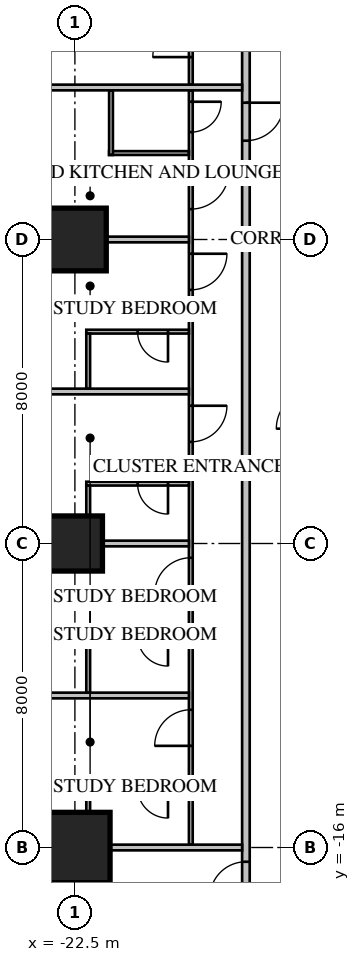
"""IFC4 building model, lengths in metres.
Left out: names, types, materials, properties, quantities, classifications, styles, units other than length and angle.
Written with IfcOpenShell. Run it as: python <this file> out.ifc"""

import sys

from ifc_helpers import new_model, si_unit, direction, frame, frame_2d, origin, origin_2d, place, context, subcontext, project, spatial, rectangle, extrude, element, fill, save


model = new_model("IFC4")
c1 = context("Model", 3, precision=1e-05, world=origin(), true_north=direction((0.0, 1.0)))
c2 = subcontext(c1, "Body", "Model", "MODEL_VIEW")
j1 = project(units=[si_unit("LENGTHUNIT", "METRE"), si_unit("PLANEANGLEUNIT", "RADIAN")], contexts=[c1])
p1 = place(None, origin())
s1 = spatial("IfcSite", under=j1, at=p1, CompositionType="ELEMENT")
p2 = place(p1, origin())
s2 = spatial("IfcBuilding", under=s1, at=p2, CompositionType="ELEMENT")
p3 = place(p2, frame((0.0, 0.0, 23.7)))
s3 = spatial("IfcBuildingStorey", under=s2, at=p3, CompositionType="ELEMENT", Elevation=23.7)
p4 = place(p3, frame((-22.5, 0.0, 0.0), z_axis=(0.0, 0.0, 1.0), x_axis=(1.0, 0.0, 0.0)))
e1 = element("IfcColumn", 1, at=p4, inside=s3, PredefinedType="COLUMN", context=c2, shape_type="SweptSolid", body=[
    extrude(rectangle(XDim=1.65, YDim=1.65, at=origin_2d()), origin(), (0.0, 0.0, 1.0), 3.85),
])
p5 = place(p3, frame((-22.5, -8.0, 0.0), z_axis=(0.0, 0.0, 1.0), x_axis=(1.0, 0.0, 0.0)))
e2 = element("IfcColumn", 2, at=p5, inside=s3, PredefinedType="COLUMN", context=c2, shape_type="SweptSolid", body=[
    extrude(rectangle(XDim=1.45, YDim=1.45, at=origin_2d()), origin(), (0.0, 0.0, 1.0), 3.85),
])
p6 = place(p3, frame((-22.5, -16.0, 0.0), z_axis=(0.0, 0.0, 1.0), x_axis=(1.0, 0.0, 0.0)))
e3 = element("IfcColumn", 3, at=p6, inside=s3, PredefinedType="COLUMN", context=c2, shape_type="SweptSolid", body=[
    extrude(rectangle(XDim=1.85, YDim=1.85, at=origin_2d()), origin(), (0.0, 0.0, 1.0), 3.85),
])
p7 = place(p3, frame((-18.0, 18.0, 0.0), z_axis=(0.0, 0.0, 1.0), x_axis=(0.0, -1.0, 0.0)))
e4 = element("IfcWall", 4, at=p7, inside=s3, PredefinedType="PARTITIONING", context=c2, shape_type="SweptSolid", body=[
    extrude(rectangle(XDim=36.0, YDim=0.2, at=frame_2d((18.0, 0.0))), origin(), (0.0, 0.0, 1.0), 3.65),
])
p8 = place(p7, frame((10.4, 0.0, 0.0)))
e5 = element("IfcOpeningElement", 5, at=p8, cuts=e4, PredefinedType="OPENING", context=c2, shape_type="SweptSolid", body=[
    extrude(rectangle(XDim=1.0, YDim=2.1, at=frame_2d((0.5, 1.05))), frame((0.0, 0.12, 0.0), z_axis=(0.0, -1.0, 0.0), x_axis=(1.0, 0.0, 0.0)), (0.0, 0.0, 1.0), 0.24),
])
p9 = place(p7, frame((14.4, 0.0, 0.0)))
e6 = element("IfcOpeningElement", 6, at=p9, cuts=e4, PredefinedType="OPENING", context=c2, shape_type="SweptSolid", body=[
    extrude(rectangle(XDim=1.0, YDim=2.1, at=frame_2d((0.5, 1.05))), frame((0.0, 0.12, 0.0), z_axis=(0.0, -1.0, 0.0), x_axis=(1.0, 0.0, 0.0)), (0.0, 0.0, 1.0), 0.24),
])
p10 = place(p7, frame((0.375, 0.0, 0.0)))
e7 = element("IfcOpeningElement", 7, at=p10, cuts=e4, PredefinedType="OPENING", context=c2, shape_type="SweptSolid", body=[
    extrude(rectangle(XDim=1.0, YDim=2.1, at=frame_2d((0.5, 1.05))), frame((0.0, 0.12, 0.0), z_axis=(0.0, -1.0, 0.0), x_axis=(1.0, 0.0, 0.0)), (0.0, 0.0, 1.0), 0.24),
])
p11 = place(p7, frame((34.375, 0.0, 0.0)))
e8 = element("IfcOpeningElement", 8, at=p11, cuts=e4, PredefinedType="OPENING", context=c2, shape_type="SweptSolid", body=[
    extrude(rectangle(XDim=0.95, YDim=2.1, at=frame_2d((0.475, 1.05))), frame((0.0, 0.12, 0.0), z_axis=(0.0, -1.0, 0.0), x_axis=(1.0, 0.0, 0.0)), (0.0, 0.0, 1.0), 0.24),
])
p12 = place(p3, frame((-19.45, 15.925, 0.0), z_axis=(0.0, 0.0, 1.0), x_axis=(0.0, -1.0, 0.0)))
e9 = element("IfcWall", 9, at=p12, inside=s3, PredefinedType="PARTITIONING", context=c2, shape_type="SweptSolid", body=[
    extrude(rectangle(XDim=11.85, YDim=0.1, at=frame_2d((5.925, 0.0))), origin(), (0.0, 0.0, 1.0), 3.65),
])
p13 = place(p12, frame((10.125, 0.0, 0.0)))
e10 = element("IfcOpeningElement", 10, at=p13, cuts=e9, PredefinedType="OPENING", context=c2, shape_type="SweptSolid", body=[
    extrude(rectangle(XDim=1.0, YDim=2.1, at=frame_2d((0.5, 1.05))), frame((0.0, 0.07, 0.0), z_axis=(0.0, -1.0, 0.0), x_axis=(1.0, 0.0, 0.0)), (0.0, 0.0, 1.0), 0.14),
])
p14 = place(p12, frame((8.3, 0.0, 0.0)))
e11 = element("IfcOpeningElement", 11, at=p14, cuts=e9, PredefinedType="OPENING", context=c2, shape_type="SweptSolid", body=[
    extrude(rectangle(XDim=0.8, YDim=2.1, at=frame_2d((0.4, 1.05))), frame((0.0, 0.07, 0.0), z_axis=(0.0, -1.0, 0.0), x_axis=(1.0, 0.0, 0.0)), (0.0, 0.0, 1.0), 0.14),
])
p15 = place(p12, frame((0.3, 0.0, 0.0)))
e12 = element("IfcOpeningElement", 12, at=p15, cuts=e9, PredefinedType="OPENING", context=c2, shape_type="SweptSolid", body=[
    extrude(rectangle(XDim=0.95, YDim=2.1, at=frame_2d((0.475, 1.05))), frame((0.0, 0.07, 0.0), z_axis=(0.0, -1.0, 0.0), x_axis=(1.0, 0.0, 0.0)), (0.0, 0.0, 1.0), 0.14),
])
p16 = place(p12, frame((4.3, 0.0, 0.0)))
e13 = element("IfcOpeningElement", 13, at=p16, cuts=e9, PredefinedType="OPENING", context=c2, shape_type="SweptSolid", body=[
    extrude(rectangle(XDim=0.95, YDim=2.1, at=frame_2d((0.475, 1.05))), frame((0.0, 0.07, 0.0), z_axis=(0.0, -1.0, 0.0), x_axis=(1.0, 0.0, 0.0)), (0.0, 0.0, 1.0), 0.14),
])
p17 = place(p3, frame((-19.45, 3.925, 0.0), z_axis=(0.0, 0.0, 1.0), x_axis=(0.0, -1.0, 0.0)))
e14 = element("IfcWall", 14, at=p17, inside=s3, PredefinedType="PARTITIONING", context=c2, shape_type="SweptSolid", body=[
    extrude(rectangle(XDim=19.85, YDim=0.1, at=frame_2d((9.925, 0.0))), origin(), (0.0, 0.0, 1.0), 3.65),
])
p18 = place(p17, frame((2.125, 0.0, 0.0)))
e15 = element("IfcOpeningElement", 15, at=p18, cuts=e14, PredefinedType="OPENING", context=c2, shape_type="SweptSolid", body=[
    extrude(rectangle(XDim=1.0, YDim=2.1, at=frame_2d((0.5, 1.05))), frame((0.0, 0.07, 0.0), z_axis=(0.0, -1.0, 0.0), x_axis=(1.0, 0.0, 0.0)), (0.0, 0.0, 1.0), 0.14),
])
p19 = place(p17, frame((0.3, 0.0, 0.0)))
e16 = element("IfcOpeningElement", 16, at=p19, cuts=e14, PredefinedType="OPENING", context=c2, shape_type="SweptSolid", body=[
    extrude(rectangle(XDim=0.8, YDim=2.1, at=frame_2d((0.4, 1.05))), frame((0.0, 0.07, 0.0), z_axis=(0.0, -1.0, 0.0), x_axis=(1.0, 0.0, 0.0)), (0.0, 0.0, 1.0), 0.14),
])
p20 = place(p17, frame((4.3, 0.0, 0.0)))
e17 = element("IfcOpeningElement", 17, at=p20, cuts=e14, PredefinedType="OPENING", context=c2, shape_type="SweptSolid", body=[
    extrude(rectangle(XDim=0.95, YDim=2.1, at=frame_2d((0.475, 1.05))), frame((0.0, 0.07, 0.0), z_axis=(0.0, -1.0, 0.0), x_axis=(1.0, 0.0, 0.0)), (0.0, 0.0, 1.0), 0.14),
])
p21 = place(p17, frame((8.3, 0.0, 0.0)))
e18 = element("IfcOpeningElement", 18, at=p21, cuts=e14, PredefinedType="OPENING", context=c2, shape_type="SweptSolid", body=[
    extrude(rectangle(XDim=0.95, YDim=2.1, at=frame_2d((0.475, 1.05))), frame((0.0, 0.07, 0.0), z_axis=(0.0, -1.0, 0.0), x_axis=(1.0, 0.0, 0.0)), (0.0, 0.0, 1.0), 0.14),
])
p22 = place(p17, frame((12.3, 0.0, 0.0)))
e19 = element("IfcOpeningElement", 19, at=p22, cuts=e14, PredefinedType="OPENING", context=c2, shape_type="SweptSolid", body=[
    extrude(rectangle(XDim=0.95, YDim=2.1, at=frame_2d((0.475, 1.05))), frame((0.0, 0.07, 0.0), z_axis=(0.0, -1.0, 0.0), x_axis=(1.0, 0.0, 0.0)), (0.0, 0.0, 1.0), 0.14),
])
p23 = place(p17, frame((16.3, 0.0, 0.0)))
e20 = element("IfcOpeningElement", 20, at=p23, cuts=e14, PredefinedType="OPENING", context=c2, shape_type="SweptSolid", body=[
    extrude(rectangle(XDim=0.95, YDim=2.1, at=frame_2d((0.475, 1.05))), frame((0.0, 0.07, 0.0), z_axis=(0.0, -1.0, 0.0), x_axis=(1.0, 0.0, 0.0)), (0.0, 0.0, 1.0), 0.14),
])
p24 = place(p3, frame((-19.5, 2.275, 0.0), z_axis=(0.0, 0.0, 1.0), x_axis=(-1.0, 0.0, 0.0)))
e21 = element("IfcWall", 21, at=p24, inside=s3, PredefinedType="PARTITIONING", context=c2, shape_type="SweptSolid", body=[
    extrude(rectangle(XDim=2.1, YDim=0.1, at=frame_2d((1.05, 0.0))), origin(), (0.0, 0.0, 1.0), 3.65),
])
p25 = place(p3, frame((-21.55, 3.925, 0.0), z_axis=(0.0, 0.0, 1.0), x_axis=(0.0, -1.0, 0.0)))
e22 = element("IfcWall", 22, at=p25, inside=s3, PredefinedType="PARTITIONING", context=c2, shape_type="SweptSolid", body=[
    extrude(rectangle(XDim=1.7, YDim=0.1, at=frame_2d((0.85, 0.0))), origin(), (0.0, 0.0, 1.0), 3.65),
])
p26 = place(p3, frame((-18.1, 4.0, 0.0), z_axis=(0.0, 0.0, 1.0), x_axis=(-1.0, 0.0, 0.0)))
e23 = element("IfcWall", 23, at=p26, inside=s3, PredefinedType="PARTITIONING", context=c2, shape_type="SweptSolid", body=[
    extrude(rectangle(XDim=6.6, YDim=0.15, at=frame_2d((3.3, 0.0))), origin(), (0.0, 0.0, 1.0), 3.65),
])
p27 = place(p3, frame((-19.5, 0.0, 0.0), z_axis=(0.0, 0.0, 1.0), x_axis=(-1.0, 0.0, 0.0)))
e24 = element("IfcWall", 24, at=p27, inside=s3, PredefinedType="PARTITIONING", context=c2, shape_type="SweptSolid", body=[
    extrude(rectangle(XDim=5.2, YDim=0.15, at=frame_2d((2.6, 0.0))), origin(), (0.0, 0.0, 1.0), 2.957),
])
for number, where, z_axis, x_axis in (
    (25, (-19.5, -4.0, 0.0), (0.0, 0.0, 1.0), (-1.0, 0.0, 0.0)),
    (26, (-19.5, -8.0, 0.0), (0.0, 0.0, 1.0), (-1.0, 0.0, 0.0)),
    (27, (-19.5, -12.0, 0.0), (0.0, 0.0, 1.0), (-1.0, 0.0, 0.0)),
):
    element("IfcWall", number, at=place(p3, frame(where, z_axis=z_axis, x_axis=x_axis)), inside=s3, PredefinedType="PARTITIONING", context=c2, shape_type="SweptSolid", body=[
        extrude(rectangle(XDim=5.2, YDim=0.15, at=frame_2d((2.6, 0.0))), origin(), (0.0, 0.0, 1.0), 3.65),
    ])
p28 = place(p3, frame((-18.1, -16.0, 0.0), z_axis=(0.0, 0.0, 1.0), x_axis=(-1.0, 0.0, 0.0)))
e28 = element("IfcWall", 28, at=p28, inside=s3, PredefinedType="PARTITIONING", context=c2, shape_type="SweptSolid", body=[
    extrude(rectangle(XDim=6.589, YDim=0.15, at=frame_2d((3.295, 0.0))), origin(), (0.0, 0.0, 1.0), 3.65),
])
p29 = place(p3, frame((-19.5, -2.425, 0.0), z_axis=(0.0, 0.0, 1.0), x_axis=(-1.0, 0.0, 0.0)))
e29 = element("IfcWall", 29, at=p29, inside=s3, PredefinedType="PARTITIONING", context=c2, shape_type="SweptSolid", body=[
    extrude(rectangle(XDim=2.7, YDim=0.1, at=frame_2d((1.35, 0.0))), origin(), (0.0, 0.0, 1.0), 3.65),
])
p30 = place(p29, frame((0.55, 0.0, 0.0)))
e30 = element("IfcOpeningElement", 30, at=p30, cuts=e29, PredefinedType="OPENING", context=c2, shape_type="SweptSolid", body=[
    extrude(rectangle(XDim=0.8, YDim=2.1, at=frame_2d((0.4, 1.05))), frame((0.0, 0.07, 0.0), z_axis=(0.0, -1.0, 0.0), x_axis=(1.0, 0.0, 0.0)), (0.0, 0.0, 1.0), 0.14),
])
p31 = place(p3, frame((-22.15, -2.475, 0.0), z_axis=(0.0, 0.0, 1.0), x_axis=(0.0, -1.0, 0.0)))
e31 = element("IfcWall", 31, at=p31, inside=s3, PredefinedType="PARTITIONING", context=c2, shape_type="SweptSolid", body=[
    extrude(rectangle(XDim=1.45, YDim=0.1, at=frame_2d((0.725, 0.0))), origin(), (0.0, 0.0, 1.0), 3.65),
])
p32 = place(p3, frame((-19.5, -6.425, 0.0), z_axis=(0.0, 0.0, 1.0), x_axis=(-1.0, 0.0, 0.0)))
e32 = element("IfcWall", 32, at=p32, inside=s3, PredefinedType="PARTITIONING", context=c2, shape_type="SweptSolid", body=[
    extrude(rectangle(XDim=2.7, YDim=0.1, at=frame_2d((1.35, 0.0))), origin(), (0.0, 0.0, 1.0), 3.65),
])
p33 = place(p32, frame((0.55, 0.0, 0.0)))
e33 = element("IfcOpeningElement", 33, at=p33, cuts=e32, PredefinedType="OPENING", context=c2, shape_type="SweptSolid", body=[
    extrude(rectangle(XDim=0.8, YDim=2.1, at=frame_2d((0.4, 1.05))), frame((0.0, 0.07, 0.0), z_axis=(0.0, -1.0, 0.0), x_axis=(1.0, 0.0, 0.0)), (0.0, 0.0, 1.0), 0.14),
])
p34 = place(p3, frame((-22.15, -6.475, 0.0), z_axis=(0.0, 0.0, 1.0), x_axis=(0.0, -1.0, 0.0)))
e34 = element("IfcWall", 34, at=p34, inside=s3, PredefinedType="PARTITIONING", context=c2, shape_type="SweptSolid", body=[
    extrude(rectangle(XDim=1.45, YDim=0.1, at=frame_2d((0.725, 0.0))), origin(), (0.0, 0.0, 1.0), 3.65),
])
p35 = place(p3, frame((-19.5, -10.425, 0.0), z_axis=(0.0, 0.0, 1.0), x_axis=(-1.0, 0.0, 0.0)))
e35 = element("IfcWall", 35, at=p35, inside=s3, PredefinedType="PARTITIONING", context=c2, shape_type="SweptSolid", body=[
    extrude(rectangle(XDim=2.7, YDim=0.1, at=frame_2d((1.35, 0.0))), origin(), (0.0, 0.0, 1.0), 3.65),
])
p36 = place(p35, frame((0.55, 0.0, 0.0)))
e36 = element("IfcOpeningElement", 36, at=p36, cuts=e35, PredefinedType="OPENING", context=c2, shape_type="SweptSolid", body=[
    extrude(rectangle(XDim=0.8, YDim=2.1, at=frame_2d((0.4, 1.05))), frame((0.0, 0.07, 0.0), z_axis=(0.0, -1.0, 0.0), x_axis=(1.0, 0.0, 0.0)), (0.0, 0.0, 1.0), 0.14),
])
p37 = place(p3, frame((-22.15, -10.475, 0.0), z_axis=(0.0, 0.0, 1.0), x_axis=(0.0, -1.0, 0.0)))
e37 = element("IfcWall", 37, at=p37, inside=s3, PredefinedType="PARTITIONING", context=c2, shape_type="SweptSolid", body=[
    extrude(rectangle(XDim=1.45, YDim=0.1, at=frame_2d((0.725, 0.0))), origin(), (0.0, 0.0, 1.0), 3.65),
])
p38 = place(p3, frame((-19.5, -14.425, 0.0), z_axis=(0.0, 0.0, 1.0), x_axis=(-1.0, 0.0, 0.0)))
e38 = element("IfcWall", 38, at=p38, inside=s3, PredefinedType="PARTITIONING", context=c2, shape_type="SweptSolid", body=[
    extrude(rectangle(XDim=2.7, YDim=0.1, at=frame_2d((1.35, 0.0))), origin(), (0.0, 0.0, 1.0), 3.65),
])
p39 = place(p38, frame((0.55, 0.0, 0.0)))
e39 = element("IfcOpeningElement", 39, at=p39, cuts=e38, PredefinedType="OPENING", context=c2, shape_type="SweptSolid", body=[
    extrude(rectangle(XDim=0.8, YDim=2.1, at=frame_2d((0.4, 1.05))), frame((0.0, 0.07, 0.0), z_axis=(0.0, -1.0, 0.0), x_axis=(1.0, 0.0, 0.0)), (0.0, 0.0, 1.0), 0.14),
])
p40 = place(p3, frame((-22.15, -14.475, 0.0), z_axis=(0.0, 0.0, 1.0), x_axis=(0.0, -1.0, 0.0)))
e40 = element("IfcWall", 40, at=p40, inside=s3, PredefinedType="PARTITIONING", context=c2, shape_type="SweptSolid", body=[
    extrude(rectangle(XDim=1.45, YDim=0.1, at=frame_2d((0.725, 0.0))), origin(), (0.0, 0.0, 1.0), 3.65),
])
p41 = place(p13, origin())
e41 = element("IfcDoor", 41, at=p41, inside=s3, OperationType="SINGLE_SWING_RIGHT", PredefinedType="DOOR", context=c2, shape_type="SweptSolid", body=[
    extrude(rectangle(XDim=1.0, YDim=2.1, at=frame_2d((0.5, 1.05))), frame((0.0, 0.025, 0.0), z_axis=(0.0, -1.0, 0.0), x_axis=(1.0, 0.0, 0.0)), (0.0, 0.0, 1.0), 0.05),
])
fill(e10, e41)
p42 = place(p9, origin())
e42 = element("IfcDoor", 42, at=p42, inside=s3, OperationType="SINGLE_SWING_LEFT", PredefinedType="DOOR", context=c2, shape_type="SweptSolid", body=[
    extrude(rectangle(XDim=1.0, YDim=2.1, at=frame_2d((0.5, 1.05))), frame((0.0, 0.025, 0.0), z_axis=(0.0, -1.0, 0.0), x_axis=(1.0, 0.0, 0.0)), (0.0, 0.0, 1.0), 0.05),
])
fill(e6, e42)
p43 = place(p18, origin())
e43 = element("IfcDoor", 43, at=p43, inside=s3, OperationType="SINGLE_SWING_LEFT", PredefinedType="DOOR", context=c2, shape_type="SweptSolid", body=[
    extrude(rectangle(XDim=1.0, YDim=2.1, at=frame_2d((0.5, 1.05))), frame((0.0, 0.025, 0.0), z_axis=(0.0, -1.0, 0.0), x_axis=(1.0, 0.0, 0.0)), (0.0, 0.0, 1.0), 0.05),
])
fill(e15, e43)
p44 = place(p19, origin())
e44 = element("IfcDoor", 44, at=p44, inside=s3, OperationType="SINGLE_SWING_LEFT", PredefinedType="DOOR", context=c2, shape_type="SweptSolid", body=[
    extrude(rectangle(XDim=0.8, YDim=2.1, at=frame_2d((0.4, 1.05))), frame((0.0, 0.025, 0.0), z_axis=(0.0, -1.0, 0.0), x_axis=(1.0, 0.0, 0.0)), (0.0, 0.0, 1.0), 0.05),
])
fill(e16, e44)
p45 = place(p20, origin())
e45 = element("IfcDoor", 45, at=p45, inside=s3, OperationType="SINGLE_SWING_LEFT", PredefinedType="DOOR", context=c2, shape_type="SweptSolid", body=[
    extrude(rectangle(XDim=0.95, YDim=2.1, at=frame_2d((0.475, 1.05))), frame((0.0, 0.025, 0.0), z_axis=(0.0, -1.0, 0.0), x_axis=(1.0, 0.0, 0.0)), (0.0, 0.0, 1.0), 0.05),
])
fill(e17, e45)
p46 = place(p30, origin())
e46 = element("IfcDoor", 46, at=p46, inside=s3, OperationType="SINGLE_SWING_LEFT", PredefinedType="DOOR", context=c2, shape_type="SweptSolid", body=[
    extrude(rectangle(XDim=0.8, YDim=2.1, at=frame_2d((0.4, 1.05))), frame((0.0, 0.025, 0.0), z_axis=(0.0, -1.0, 0.0), x_axis=(1.0, 0.0, 0.0)), (0.0, 0.0, 1.0), 0.05),
])
fill(e30, e46)
p47 = place(p21, origin())
e47 = element("IfcDoor", 47, at=p47, inside=s3, OperationType="SINGLE_SWING_LEFT", PredefinedType="DOOR", context=c2, shape_type="SweptSolid", body=[
    extrude(rectangle(XDim=0.95, YDim=2.1, at=frame_2d((0.475, 1.05))), frame((0.0, 0.025, 0.0), z_axis=(0.0, -1.0, 0.0), x_axis=(1.0, 0.0, 0.0)), (0.0, 0.0, 1.0), 0.05),
])
fill(e18, e47)
p48 = place(p33, origin())
e48 = element("IfcDoor", 48, at=p48, inside=s3, OperationType="SINGLE_SWING_LEFT", PredefinedType="DOOR", context=c2, shape_type="SweptSolid", body=[
    extrude(rectangle(XDim=0.8, YDim=2.1, at=frame_2d((0.4, 1.05))), frame((0.0, 0.025, 0.0), z_axis=(0.0, -1.0, 0.0), x_axis=(1.0, 0.0, 0.0)), (0.0, 0.0, 1.0), 0.05),
])
fill(e33, e48)
p49 = place(p22, origin())
e49 = element("IfcDoor", 49, at=p49, inside=s3, OperationType="SINGLE_SWING_RIGHT", PredefinedType="DOOR", context=c2, shape_type="SweptSolid", body=[
    extrude(rectangle(XDim=0.95, YDim=2.1, at=frame_2d((0.475, 1.05))), frame((0.0, 0.025, 0.0), z_axis=(0.0, -1.0, 0.0), x_axis=(1.0, 0.0, 0.0)), (0.0, 0.0, 1.0), 0.05),
])
fill(e19, e49)
p50 = place(p36, origin())
e50 = element("IfcDoor", 50, at=p50, inside=s3, OperationType="SINGLE_SWING_LEFT", PredefinedType="DOOR", context=c2, shape_type="SweptSolid", body=[
    extrude(rectangle(XDim=0.8, YDim=2.1, at=frame_2d((0.4, 1.05))), frame((0.0, 0.025, 0.0), z_axis=(0.0, -1.0, 0.0), x_axis=(1.0, 0.0, 0.0)), (0.0, 0.0, 1.0), 0.05),
])
fill(e36, e50)
p51 = place(p23, origin())
e51 = element("IfcDoor", 51, at=p51, inside=s3, OperationType="SINGLE_SWING_RIGHT", PredefinedType="DOOR", context=c2, shape_type="SweptSolid", body=[
    extrude(rectangle(XDim=0.95, YDim=2.1, at=frame_2d((0.475, 1.05))), frame((0.0, 0.025, 0.0), z_axis=(0.0, -1.0, 0.0), x_axis=(1.0, 0.0, 0.0)), (0.0, 0.0, 1.0), 0.05),
])
fill(e20, e51)
p52 = place(p39, origin())
e52 = element("IfcDoor", 52, at=p52, inside=s3, OperationType="SINGLE_SWING_LEFT", PredefinedType="DOOR", context=c2, shape_type="SweptSolid", body=[
    extrude(rectangle(XDim=0.8, YDim=2.1, at=frame_2d((0.4, 1.05))), frame((0.0, 0.025, 0.0), z_axis=(0.0, -1.0, 0.0), x_axis=(1.0, 0.0, 0.0)), (0.0, 0.0, 1.0), 0.05),
])
fill(e39, e52)
p53 = place(p11, origin())
e53 = element("IfcDoor", 53, at=p53, inside=s3, OperationType="SINGLE_SWING_RIGHT", PredefinedType="DOOR", context=c2, shape_type="SweptSolid", body=[
    extrude(rectangle(XDim=0.95, YDim=2.1, at=frame_2d((0.475, 1.05))), frame((0.0, 0.025, 0.0), z_axis=(0.0, -1.0, 0.0), x_axis=(1.0, 0.0, 0.0)), (0.0, 0.0, 1.0), 0.05),
])
fill(e8, e53)
save(model, sys.argv[1])
